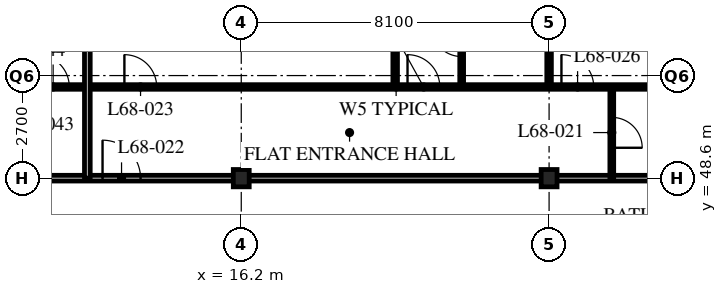
"""IFC4 building model, lengths in metres.
Left out: names, types, materials, properties, quantities, classifications, styles, units other than length and angle.
Written with IfcOpenShell. Run it as: python <this file> out.ifc"""

import sys

from ifc_helpers import new_model, si_unit, direction, frame, frame_2d, origin, origin_2d, place, context, subcontext, project, spatial, rectangle, i_section, extrude, element, fill, save


model = new_model("IFC4")
c1 = context("Model", 3, precision=1e-05, world=origin(), true_north=direction((0.0, 1.0)))
c2 = subcontext(c1, "Body", "Model", "MODEL_VIEW")
j1 = project(units=[si_unit("LENGTHUNIT", "METRE"), si_unit("PLANEANGLEUNIT", "RADIAN")], contexts=[c1])
p1 = place(None, origin())
s1 = spatial("IfcSite", under=j1, at=p1, CompositionType="ELEMENT")
p2 = place(p1, origin())
s2 = spatial("IfcBuilding", under=s1, at=p2, CompositionType="ELEMENT")
p3 = place(p2, frame((0.0, 0.0, 265.8)))
s3 = spatial("IfcBuildingStorey", under=s2, at=p3, CompositionType="ELEMENT", Elevation=265.8)
for number, where, z_axis, x_axis in (
    (1, (16.2, 48.6, 0.0), (0.0, 0.0, 1.0), (1.0, 0.0, 0.0)),
    (2, (24.3, 48.6, 0.0), (0.0, 0.0, 1.0), (1.0, 0.0, 0.0)),
):
    element("IfcColumn", number, at=place(p3, frame(where, z_axis=z_axis, x_axis=x_axis)), inside=s3, PredefinedType="COLUMN", context=c2, shape_type="SweptSolid", body=[
        extrude(i_section(OverallWidth=0.418, OverallDepth=0.456, WebThickness=0.042, FlangeThickness=0.067, FilletRadius=0.015, at=origin_2d()), origin(), (0.0, 0.0, 1.0), 3.9),
    ])
p4 = place(p3, frame((8.1, 48.6, 0.0), z_axis=(0.0, 0.0, 1.0), x_axis=(1.0, 0.0, 0.0)))
e3 = element("IfcWall", 3, at=p4, inside=s3, PredefinedType="PARTITIONING", context=c2, shape_type="SweptSolid", body=[
    extrude(rectangle(XDim=28.35, YDim=0.15, at=frame_2d((14.175, 0.0))), origin(), (0.0, 0.0, 1.0), 3.078),
])
p5 = place(p4, frame((4.45, 0.0, 0.0)))
e4 = element("IfcOpeningElement", 4, at=p5, cuts=e3, PredefinedType="OPENING", context=c2, shape_type="SweptSolid", body=[
    extrude(rectangle(XDim=1.0, YDim=2.1, at=frame_2d((0.5, 1.05))), frame((0.0, 0.085, 0.0), z_axis=(0.0, -1.0, 0.0), x_axis=(1.0, 0.0, 0.0)), (0.0, 0.0, 1.0), 0.17),
])
p6 = place(p4, frame((20.65, 0.0, 0.0)))
e5 = element("IfcOpeningElement", 5, at=p6, cuts=e3, PredefinedType="OPENING", context=c2, shape_type="SweptSolid", body=[
    extrude(rectangle(XDim=1.0, YDim=2.1, at=frame_2d((0.5, 1.05))), frame((0.0, 0.085, 0.0), z_axis=(0.0, -1.0, 0.0), x_axis=(1.0, 0.0, 0.0)), (0.0, 0.0, 1.0), 0.17),
])
p7 = place(p4, frame((1.525, 0.0, 0.0)))
e6 = element("IfcOpeningElement", 6, at=p7, cuts=e3, PredefinedType="OPENING", context=c2, shape_type="SweptSolid", body=[
    extrude(rectangle(XDim=1.0, YDim=2.1, at=frame_2d((0.5, 1.05))), frame((0.0, 0.085, 0.0), z_axis=(0.0, -1.0, 0.0), x_axis=(1.0, 0.0, 0.0)), (0.0, 0.0, 1.0), 0.17),
])
p8 = place(p3, frame((25.95, 48.6, 0.0), z_axis=(0.0, 0.0, 1.0), x_axis=(0.0, 1.0, 0.0)))
e7 = element("IfcWall", 7, at=p8, inside=s3, PredefinedType="PARTITIONING", context=c2, shape_type="SweptSolid", body=[
    extrude(rectangle(XDim=2.4, YDim=0.1, at=frame_2d((1.2, 0.0))), origin(), (0.0, 0.0, 1.0), 3.69),
])
p9 = place(p8, frame((0.8, 0.0, 0.0)))
e8 = element("IfcOpeningElement", 8, at=p9, cuts=e7, PredefinedType="OPENING", context=c2, shape_type="SweptSolid", body=[
    extrude(rectangle(XDim=0.8, YDim=2.1, at=frame_2d((0.4, 1.05))), frame((0.0, 0.06, 0.0), z_axis=(0.0, -1.0, 0.0), x_axis=(1.0, 0.0, 0.0)), (0.0, 0.0, 1.0), 0.12),
])
p10 = place(p3, frame((22.0, 51.0, 0.0), z_axis=(0.0, 0.0, 1.0), x_axis=(0.0, 1.0, 0.0)))
e9 = element("IfcWall", 9, at=p10, inside=s3, PredefinedType="PARTITIONING", context=c2, shape_type="SweptSolid", body=[
    extrude(rectangle(XDim=2.4, YDim=0.1, at=frame_2d((1.2, 0.0))), origin(), (0.0, 0.0, 1.0), 3.69),
])
p11 = place(p10, frame((0.8, 0.0, 0.0)))
e10 = element("IfcOpeningElement", 10, at=p11, cuts=e9, PredefinedType="OPENING", context=c2, shape_type="SweptSolid", body=[
    extrude(rectangle(XDim=0.8, YDim=2.1, at=frame_2d((0.4, 1.05))), frame((0.0, 0.06, 0.0), z_axis=(0.0, -1.0, 0.0), x_axis=(1.0, 0.0, 0.0)), (0.0, 0.0, 1.0), 0.12),
])
p12 = place(p3, frame((20.25, 51.0, 0.0), z_axis=(0.0, 0.0, 1.0), x_axis=(0.0, 1.0, 0.0)))
e11 = element("IfcWall", 11, at=p12, inside=s3, PredefinedType="PARTITIONING", context=c2, shape_type="SweptSolid", body=[
    extrude(rectangle(XDim=13.5, YDim=0.12, at=frame_2d((6.75, 0.0))), origin(), (0.0, 0.0, 1.0), 3.69),
])
p13 = place(p3, frame((24.3, 51.0, 0.0), z_axis=(0.0, 0.0, 1.0), x_axis=(0.0, 1.0, 0.0)))
e12 = element("IfcWall", 12, at=p13, inside=s3, PredefinedType="PARTITIONING", context=c2, shape_type="SweptSolid", body=[
    extrude(rectangle(XDim=13.5, YDim=0.12, at=frame_2d((6.75, 0.0))), origin(), (0.0, 0.0, 1.0), 3.078),
])
p14 = place(p3, frame((4.1, 51.0, 0.0), z_axis=(0.0, 0.0, 1.0), x_axis=(1.0, 0.0, 0.0)))
e13 = element("IfcWall", 13, at=p14, inside=s3, PredefinedType="PARTITIONING", context=c2, shape_type="SweptSolid", body=[
    extrude(rectangle(XDim=32.35, YDim=0.12, at=frame_2d((16.175, 0.0))), origin(), (0.0, 0.0, 1.0), 3.69),
])
p15 = place(p14, frame((9.025, 0.0, 0.0)))
e14 = element("IfcOpeningElement", 14, at=p15, cuts=e13, PredefinedType="OPENING", context=c2, shape_type="SweptSolid", body=[
    extrude(rectangle(XDim=0.85, YDim=2.1, at=frame_2d((0.425, 1.05))), frame((0.0, 0.07, 0.0), z_axis=(0.0, -1.0, 0.0), x_axis=(1.0, 0.0, 0.0)), (0.0, 0.0, 1.0), 0.14),
])
p16 = place(p14, frame((16.475, 0.0, 0.0)))
e15 = element("IfcOpeningElement", 15, at=p16, cuts=e13, PredefinedType="OPENING", context=c2, shape_type="SweptSolid", body=[
    extrude(rectangle(XDim=0.85, YDim=2.1, at=frame_2d((0.425, 1.05))), frame((0.0, 0.07, 0.0), z_axis=(0.0, -1.0, 0.0), x_axis=(1.0, 0.0, 0.0)), (0.0, 0.0, 1.0), 0.14),
])
p17 = place(p14, frame((20.525, 0.0, 0.0)))
e16 = element("IfcOpeningElement", 16, at=p17, cuts=e13, PredefinedType="OPENING", context=c2, shape_type="SweptSolid", body=[
    extrude(rectangle(XDim=0.85, YDim=2.1, at=frame_2d((0.425, 1.05))), frame((0.0, 0.07, 0.0), z_axis=(0.0, -1.0, 0.0), x_axis=(1.0, 0.0, 0.0)), (0.0, 0.0, 1.0), 0.14),
])
p18 = place(p14, frame((25.225, 0.0, 0.0)))
e17 = element("IfcOpeningElement", 17, at=p18, cuts=e13, PredefinedType="OPENING", context=c2, shape_type="SweptSolid", body=[
    extrude(rectangle(XDim=0.85, YDim=2.1, at=frame_2d((0.425, 1.05))), frame((0.0, 0.07, 0.0), z_axis=(0.0, -1.0, 0.0), x_axis=(1.0, 0.0, 0.0)), (0.0, 0.0, 1.0), 0.14),
])
p19 = place(p14, frame((28.625, 0.0, 0.0)))
e18 = element("IfcOpeningElement", 18, at=p19, cuts=e13, PredefinedType="OPENING", context=c2, shape_type="SweptSolid", body=[
    extrude(rectangle(XDim=0.85, YDim=2.1, at=frame_2d((0.425, 1.05))), frame((0.0, 0.07, 0.0), z_axis=(0.0, -1.0, 0.0), x_axis=(1.0, 0.0, 0.0)), (0.0, 0.0, 1.0), 0.14),
])
p20 = place(p14, frame((6.725, 0.0, 0.0)))
e19 = element("IfcOpeningElement", 19, at=p20, cuts=e13, PredefinedType="OPENING", context=c2, shape_type="SweptSolid", body=[
    extrude(rectangle(XDim=0.85, YDim=2.1, at=frame_2d((0.425, 1.05))), frame((0.0, 0.07, 0.0), z_axis=(0.0, -1.0, 0.0), x_axis=(1.0, 0.0, 0.0)), (0.0, 0.0, 1.0), 0.14),
])
p21 = place(p14, frame((2.875, 0.0, 0.0)))
e20 = element("IfcOpeningElement", 20, at=p21, cuts=e13, PredefinedType="OPENING", context=c2, shape_type="SweptSolid", body=[
    extrude(rectangle(XDim=0.85, YDim=2.1, at=frame_2d((0.425, 1.05))), frame((0.0, 0.07, 0.0), z_axis=(0.0, -1.0, 0.0), x_axis=(1.0, 0.0, 0.0)), (0.0, 0.0, 1.0), 0.14),
])
p22 = place(p3, frame((12.15, 48.6, 0.0), z_axis=(0.0, 0.0, 1.0), x_axis=(0.0, 1.0, 0.0)))
e21 = element("IfcWall", 21, at=p22, inside=s3, PredefinedType="PARTITIONING", context=c2, shape_type="SweptSolid", body=[
    extrude(rectangle(XDim=15.9, YDim=0.15, at=frame_2d((7.95, 0.0))), origin(), (0.0, 0.0, 1.0), 3.69),
])
p23 = place(p9, origin())
e22 = element("IfcDoor", 22, at=p23, inside=s3, OperationType="SINGLE_SWING_RIGHT", PredefinedType="DOOR", context=c2, shape_type="SweptSolid", body=[
    extrude(rectangle(XDim=0.8, YDim=2.1, at=frame_2d((0.4, 1.05))), frame((0.0, 0.025, 0.0), z_axis=(0.0, -1.0, 0.0), x_axis=(1.0, 0.0, 0.0)), (0.0, 0.0, 1.0), 0.05),
])
fill(e8, e22)
p24 = place(p5, origin())
e23 = element("IfcDoor", 23, at=p24, inside=s3, OperationType="SINGLE_SWING_LEFT", PredefinedType="DOOR", context=c2, shape_type="SweptSolid", body=[
    extrude(rectangle(XDim=1.0, YDim=2.1, at=frame_2d((0.5, 1.05))), frame((0.0, 0.025, 0.0), z_axis=(0.0, -1.0, 0.0), x_axis=(1.0, 0.0, 0.0)), (0.0, 0.0, 1.0), 0.05),
])
fill(e4, e23)
p25 = place(p15, origin())
e24 = element("IfcDoor", 24, at=p25, inside=s3, OperationType="SINGLE_SWING_LEFT", PredefinedType="DOOR", context=c2, shape_type="SweptSolid", body=[
    extrude(rectangle(XDim=0.85, YDim=2.1, at=frame_2d((0.425, 1.05))), frame((0.0, 0.025, 0.0), z_axis=(0.0, -1.0, 0.0), x_axis=(1.0, 0.0, 0.0)), (0.0, 0.0, 1.0), 0.05),
])
fill(e14, e24)
p26 = place(p11, origin())
e25 = element("IfcDoor", 25, at=p26, inside=s3, OperationType="SINGLE_SWING_RIGHT", PredefinedType="DOOR", context=c2, shape_type="SweptSolid", body=[
    extrude(rectangle(XDim=0.8, YDim=2.1, at=frame_2d((0.4, 1.05))), frame((0.0, 0.025, 0.0), z_axis=(0.0, -1.0, 0.0), x_axis=(1.0, 0.0, 0.0)), (0.0, 0.0, 1.0), 0.05),
])
fill(e10, e25)
p27 = place(p16, origin())
e26 = element("IfcDoor", 26, at=p27, inside=s3, OperationType="SINGLE_SWING_LEFT", PredefinedType="DOOR", context=c2, shape_type="SweptSolid", body=[
    extrude(rectangle(XDim=0.85, YDim=2.1, at=frame_2d((0.425, 1.05))), frame((0.0, 0.025, 0.0), z_axis=(0.0, -1.0, 0.0), x_axis=(1.0, 0.0, 0.0)), (0.0, 0.0, 1.0), 0.05),
])
fill(e15, e26)
p28 = place(p17, origin())
e27 = element("IfcDoor", 27, at=p28, inside=s3, OperationType="SINGLE_SWING_LEFT", PredefinedType="DOOR", context=c2, shape_type="SweptSolid", body=[
    extrude(rectangle(XDim=0.85, YDim=2.1, at=frame_2d((0.425, 1.05))), frame((0.0, 0.025, 0.0), z_axis=(0.0, -1.0, 0.0), x_axis=(1.0, 0.0, 0.0)), (0.0, 0.0, 1.0), 0.05),
])
fill(e16, e27)
p29 = place(p20, origin())
e28 = element("IfcDoor", 28, at=p29, inside=s3, OperationType="SINGLE_SWING_LEFT", PredefinedType="DOOR", context=c2, shape_type="SweptSolid", body=[
    extrude(rectangle(XDim=0.85, YDim=2.1, at=frame_2d((0.425, 1.05))), frame((0.0, 0.025, 0.0), z_axis=(0.0, -1.0, 0.0), x_axis=(1.0, 0.0, 0.0)), (0.0, 0.0, 1.0), 0.05),
])
fill(e19, e28)
save(model, sys.argv[1])
